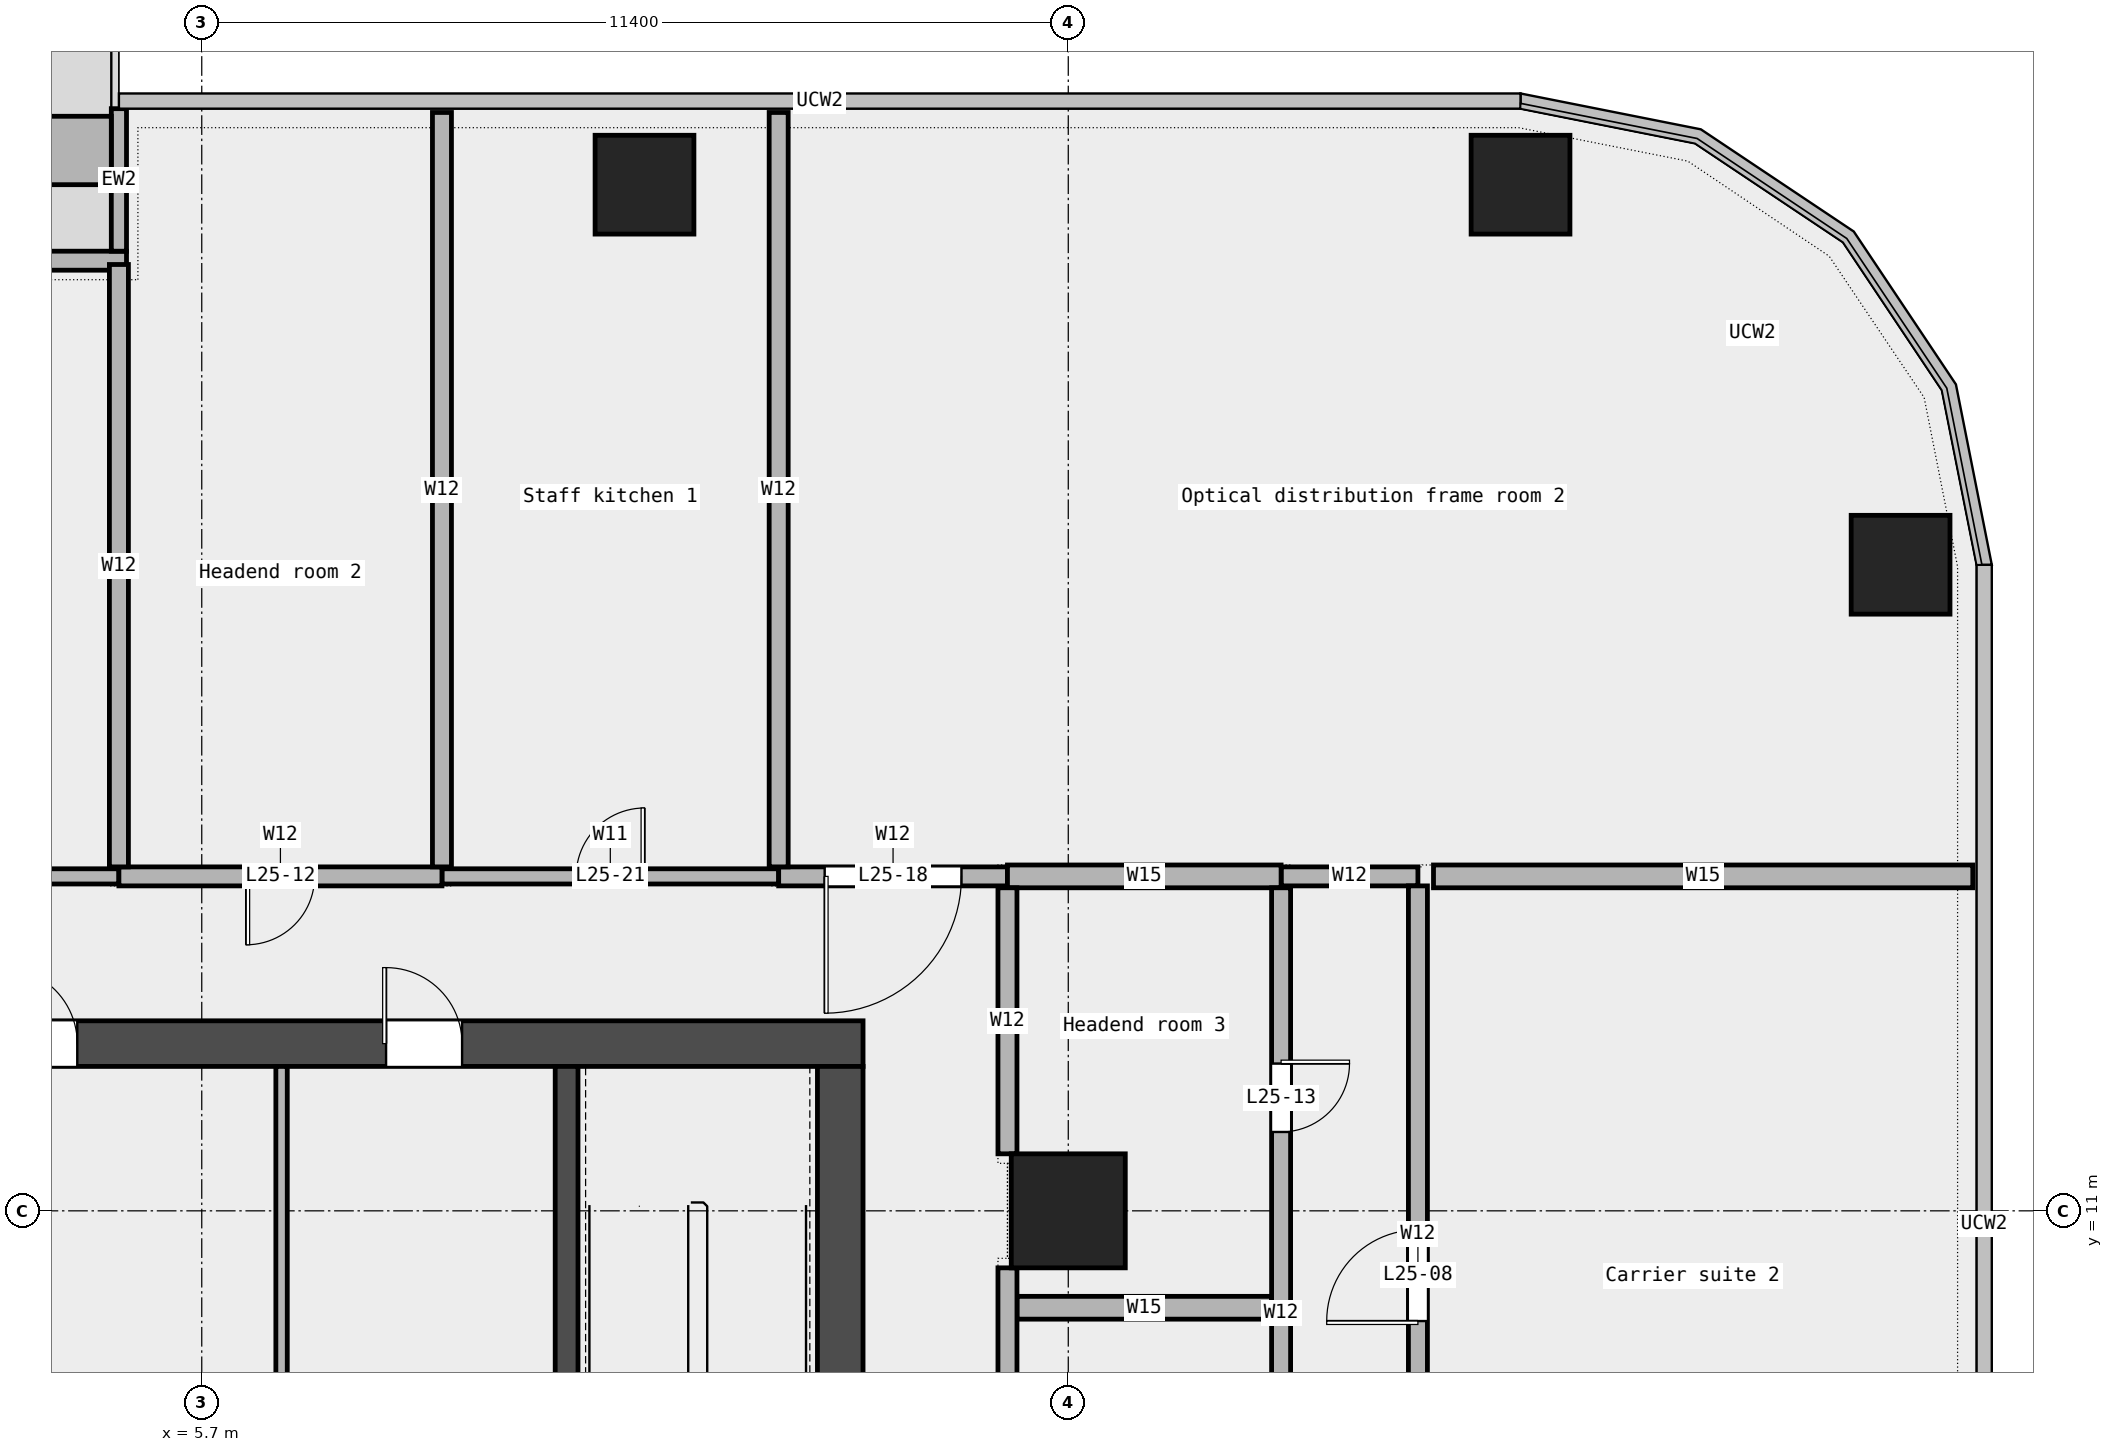
"""IFC4 building model, lengths in metres.
Left out: names, types, materials, properties, quantities, classifications, styles, units other than length and angle.
Written with IfcOpenShell. Run it as: python <this file> out.ifc"""

import sys

from ifc_helpers import new_model, si_unit, direction, frame, frame_2d, origin, origin_2d, place, context, subcontext, project, spatial, rectangle, extrude, element, fill, save


model = new_model("IFC4")
c1 = context("Model", 3, precision=1e-05, world=origin(), true_north=direction((0.0, 1.0)))
c2 = subcontext(c1, "Body", "Model", "MODEL_VIEW")
j1 = project(units=[si_unit("LENGTHUNIT", "METRE"), si_unit("PLANEANGLEUNIT", "RADIAN")], contexts=[c1])
p1 = place(None, origin())
s1 = spatial("IfcSite", under=j1, at=p1, CompositionType="ELEMENT")
p2 = place(p1, origin())
s2 = spatial("IfcBuilding", under=s1, at=p2, CompositionType="ELEMENT")
p3 = place(p2, frame((0.0, 0.0, 126.1)))
s3 = spatial("IfcBuildingStorey", under=s2, at=p3, CompositionType="ELEMENT", Elevation=126.1)
for number, where, z_axis, x_axis in (
    (1, (28.05, 19.5, 0.0), (0.0, 0.0, 1.0), (1.0, 0.0, 0.0)),
    (2, (23.05, 24.5, 0.0), (0.0, 0.0, 1.0), (1.0, 0.0, 0.0)),
    (3, (11.525, 24.5, 0.0), (0.0, 0.0, 1.0), (1.0, 0.0, 0.0)),
):
    element("IfcColumn", number, at=place(p3, frame(where, z_axis=z_axis, x_axis=x_axis)), inside=s3, PredefinedType="COLUMN", context=c2, shape_type="SweptSolid", body=[
        extrude(rectangle(XDim=1.3, YDim=1.3, at=origin_2d()), origin(), (0.0, 0.0, 1.0), 4.05),
    ])
p4 = place(p3, frame((17.1, 11.0, 0.0), z_axis=(0.0, 0.0, 1.0), x_axis=(1.0, 0.0, 0.0)))
e4 = element("IfcColumn", 4, at=p4, inside=s3, PredefinedType="COLUMN", context=c2, shape_type="SweptSolid", body=[
    extrude(rectangle(XDim=1.5, YDim=1.5, at=origin_2d()), origin(), (0.0, 0.0, 1.0), 4.05),
])
p5 = place(p3, frame((4.71, 23.5, 0.0), z_axis=(0.0, 0.0, 1.0), x_axis=(-1.0, 0.0, 0.0)))
e5 = element("IfcWall", 5, at=p5, inside=s3, PredefinedType="STANDARD", context=c2, shape_type="SweptSolid", body=[
    extrude(rectangle(XDim=14.03, YDim=0.25, at=frame_2d((7.015, 0.0))), origin(), (0.0, 0.0, 1.0), 4.05),
])
p6 = place(p5, frame((1.75, 0.0, 0.45)))
e6 = element("IfcOpeningElement", 6, at=p6, cuts=e5, PredefinedType="OPENING", context=c2, shape_type="SweptSolid", body=[
    extrude(rectangle(XDim=1.5, YDim=3.0, at=frame_2d((0.75, 1.5))), frame((0.0, 0.137, 0.0), z_axis=(0.0, -1.0, 0.0), x_axis=(1.0, 0.0, 0.0)), (0.0, 0.0, 1.0), 0.274),
])
p7 = place(p5, frame((6.0, 0.0, 0.0)))
e7 = element("IfcOpeningElement", 7, at=p7, cuts=e5, PredefinedType="OPENING", context=c2, shape_type="SweptSolid", body=[
    extrude(rectangle(XDim=1.8, YDim=2.4, at=frame_2d((0.9, 1.2))), frame((0.0, 0.137, 0.0), z_axis=(0.0, -1.0, 0.0), x_axis=(1.0, 0.0, 0.0)), (0.0, 0.0, 1.0), 0.274),
])
p8 = place(p5, frame((10.75, 0.0, 0.45)))
e8 = element("IfcOpeningElement", 8, at=p8, cuts=e5, PredefinedType="OPENING", context=c2, shape_type="SweptSolid", body=[
    extrude(rectangle(XDim=1.5, YDim=3.0, at=frame_2d((0.75, 1.5))), frame((0.0, 0.137, 0.0), z_axis=(0.0, -1.0, 0.0), x_axis=(1.0, 0.0, 0.0)), (0.0, 0.0, 1.0), 0.274),
])
p9 = place(p3, frame((4.61, 25.5, 0.0), z_axis=(0.0, 0.0, 1.0), x_axis=(0.0, -1.0, 0.0)))
e9 = element("IfcWall", 9, at=p9, inside=s3, PredefinedType="STANDARD", context=c2, shape_type="SweptSolid", body=[
    extrude(rectangle(XDim=1.875, YDim=0.2, at=frame_2d((0.938, 0.0))), origin(), (0.0, 0.0, 1.0), 4.05),
])
p10 = place(p3, frame((4.51, 24.95, 0.0), z_axis=(0.0, 0.0, 1.0), x_axis=(-1.0, 0.0, 0.0)))
e10 = element("IfcWall", 10, at=p10, inside=s3, PredefinedType="STANDARD", context=c2, shape_type="SweptSolid", body=[
    extrude(rectangle(XDim=3.6, YDim=0.9, at=frame_2d((1.8, 0.0))), origin(), (0.0, 0.0, 1.0), 0.7),
])
p11 = place(p3, frame((16.425, 9.725, 0.0), z_axis=(0.0, 0.0, 1.0), x_axis=(1.0, 0.0, 0.0)))
e11 = element("IfcWall", 11, at=p11, inside=s3, PredefinedType="PARTITIONING", context=c2, shape_type="SweptSolid", body=[
    extrude(rectangle(XDim=3.35, YDim=0.3, at=frame_2d((1.675, 0.0))), origin(), (0.0, 0.0, 1.0), 4.05),
])
p12 = place(p3, frame((-16.3, 15.4, 0.0), z_axis=(0.0, 0.0, 1.0), x_axis=(1.0, 0.0, 0.0)))
e12 = element("IfcWall", 12, at=p12, inside=s3, PredefinedType="PARTITIONING", context=c2, shape_type="SweptSolid", body=[
    extrude(rectangle(XDim=20.91, YDim=0.2, at=frame_2d((10.455, 0.0))), origin(), (0.0, 0.0, 1.0), 4.05),
])
p13 = place(p12, frame((13.245, 0.0, 0.0)))
e13 = element("IfcOpeningElement", 13, at=p13, cuts=e12, PredefinedType="OPENING", context=c2, shape_type="SweptSolid", body=[
    extrude(rectangle(XDim=1.5, YDim=2.1, at=frame_2d((0.75, 1.05))), frame((0.0, 0.112, 0.0), z_axis=(0.0, -1.0, 0.0), x_axis=(1.0, 0.0, 0.0)), (0.0, 0.0, 1.0), 0.224),
])
p14 = place(p12, frame((2.387, 0.0, 0.0)))
e14 = element("IfcOpeningElement", 14, at=p14, cuts=e12, PredefinedType="OPENING", context=c2, shape_type="SweptSolid", body=[
    extrude(rectangle(XDim=1.2, YDim=2.1, at=frame_2d((0.6, 1.05))), frame((0.0, 0.112, 0.0), z_axis=(0.0, -1.0, 0.0), x_axis=(1.0, 0.0, 0.0)), (0.0, 0.0, 1.0), 0.224),
])
p15 = place(p3, frame((8.86, 15.4, 0.0), z_axis=(0.0, 0.0, 1.0), x_axis=(1.0, 0.0, 0.0)))
e15 = element("IfcWall", 15, at=p15, inside=s3, PredefinedType="PARTITIONING", context=c2, shape_type="SweptSolid", body=[
    extrude(rectangle(XDim=4.43, YDim=0.2, at=frame_2d((2.215, 0.0))), origin(), (0.0, 0.0, 1.0), 4.05),
])
p16 = place(p15, frame((1.765, 0.0, 0.0)))
e16 = element("IfcOpeningElement", 16, at=p16, cuts=e15, PredefinedType="OPENING", context=c2, shape_type="SweptSolid", body=[
    extrude(rectangle(XDim=0.9, YDim=2.1, at=frame_2d((0.45, 1.05))), frame((0.0, 0.112, 0.0), z_axis=(0.0, -1.0, 0.0), x_axis=(1.0, 0.0, 0.0)), (0.0, 0.0, 1.0), 0.224),
])
p17 = place(p3, frame((4.61, 15.4, 0.0), z_axis=(0.0, 0.0, 1.0), x_axis=(1.0, 0.0, 0.0)))
e17 = element("IfcWall", 17, at=p17, inside=s3, PredefinedType="PARTITIONING", context=c2, shape_type="SweptSolid", body=[
    extrude(rectangle(XDim=4.25, YDim=0.25, at=frame_2d((2.125, 0.0))), origin(), (0.0, 0.0, 1.0), 4.05),
])
p18 = place(p17, frame((1.675, 0.0, 0.0)))
e18 = element("IfcOpeningElement", 18, at=p18, cuts=e17, PredefinedType="OPENING", context=c2, shape_type="SweptSolid", body=[
    extrude(rectangle(XDim=0.9, YDim=2.1, at=frame_2d((0.45, 1.05))), frame((0.0, 0.137, 0.0), z_axis=(0.0, -1.0, 0.0), x_axis=(1.0, 0.0, 0.0)), (0.0, 0.0, 1.0), 0.274),
])
p19 = place(p3, frame((13.29, 15.4, 0.0), z_axis=(0.0, 0.0, 1.0), x_axis=(1.0, 0.0, 0.0)))
e19 = element("IfcWall", 19, at=p19, inside=s3, PredefinedType="PARTITIONING", context=c2, shape_type="SweptSolid", body=[
    extrude(rectangle(XDim=3.01, YDim=0.25, at=frame_2d((1.505, 0.0))), origin(), (0.0, 0.0, 1.0), 4.05),
])
p20 = place(p19, frame((0.605, 0.0, 0.0)))
e20 = element("IfcOpeningElement", 20, at=p20, cuts=e19, PredefinedType="OPENING", context=c2, shape_type="SweptSolid", body=[
    extrude(rectangle(XDim=1.8, YDim=2.1, at=frame_2d((0.9, 1.05))), frame((0.0, 0.137, 0.0), z_axis=(0.0, -1.0, 0.0), x_axis=(1.0, 0.0, 0.0)), (0.0, 0.0, 1.0), 0.274),
])
p21 = place(p3, frame((19.9, 15.4, 0.0), z_axis=(0.0, 0.0, 1.0), x_axis=(1.0, 0.0, 0.0)))
e21 = element("IfcWall", 21, at=p21, inside=s3, PredefinedType="PARTITIONING", context=c2, shape_type="SweptSolid", body=[
    extrude(rectangle(XDim=1.8, YDim=0.25, at=frame_2d((0.9, 0.0))), origin(), (0.0, 0.0, 1.0), 4.05),
])
p22 = place(p3, frame((16.3, 15.4, 0.0), z_axis=(0.0, 0.0, 1.0), x_axis=(1.0, 0.0, 0.0)))
e22 = element("IfcWall", 22, at=p22, inside=s3, PredefinedType="PARTITIONING", context=c2, shape_type="SweptSolid", body=[
    extrude(rectangle(XDim=3.6, YDim=0.3, at=frame_2d((1.8, 0.0))), origin(), (0.0, 0.0, 1.0), 4.05),
])
p23 = place(p3, frame((21.905, 15.4, 0.0), z_axis=(0.0, 0.0, 1.0), x_axis=(1.0, 0.0, 0.0)))
e23 = element("IfcWall", 23, at=p23, inside=s3, PredefinedType="PARTITIONING", context=c2, shape_type="SweptSolid", body=[
    extrude(rectangle(XDim=7.095, YDim=0.3, at=frame_2d((3.547, 0.0))), origin(), (0.0, 0.0, 1.0), 4.05),
])
p24 = place(p3, frame((4.61, 15.525, 0.0), z_axis=(0.0, 0.0, 1.0), x_axis=(0.0, 1.0, 0.0)))
e24 = element("IfcWall", 24, at=p24, inside=s3, PredefinedType="PARTITIONING", context=c2, shape_type="SweptSolid", body=[
    extrude(rectangle(XDim=7.925, YDim=0.25, at=frame_2d((3.962, 0.0))), origin(), (0.0, 0.0, 1.0), 4.05),
])
for number, where, z_axis, x_axis in (
    (25, (8.86, 15.525, 0.0), (0.0, 0.0, 1.0), (0.0, 1.0, 0.0)),
    (26, (13.29, 15.525, 0.0), (0.0, 0.0, 1.0), (0.0, 1.0, 0.0)),
):
    element("IfcWall", number, at=place(p3, frame(where, z_axis=z_axis, x_axis=x_axis)), inside=s3, PredefinedType="PARTITIONING", context=c2, shape_type="SweptSolid", body=[
        extrude(rectangle(XDim=9.925, YDim=0.25, at=frame_2d((4.962, 0.0))), origin(), (0.0, 0.0, 1.0), 4.05),
    ])
p25 = place(p3, frame((16.3, 4.07, 0.0), z_axis=(0.0, 0.0, 1.0), x_axis=(0.0, 1.0, 0.0)))
e27 = element("IfcWall", 27, at=p25, inside=s3, PredefinedType="PARTITIONING", context=c2, shape_type="SweptSolid", body=[
    extrude(rectangle(XDim=6.18, YDim=0.25, at=frame_2d((3.09, 0.0))), origin(), (0.0, 0.0, 1.0), 4.05),
])
p26 = place(p3, frame((16.3, 11.75, 0.0), z_axis=(0.0, 0.0, 1.0), x_axis=(0.0, 1.0, 0.0)))
e28 = element("IfcWall", 28, at=p26, inside=s3, PredefinedType="PARTITIONING", context=c2, shape_type="SweptSolid", body=[
    extrude(rectangle(XDim=3.5, YDim=0.25, at=frame_2d((1.75, 0.0))), origin(), (0.0, 0.0, 1.0), 4.05),
])
p27 = place(p3, frame((19.9, 4.07, 0.0), z_axis=(0.0, 0.0, 1.0), x_axis=(0.0, 1.0, 0.0)))
e29 = element("IfcWall", 29, at=p27, inside=s3, PredefinedType="PARTITIONING", context=c2, shape_type="SweptSolid", body=[
    extrude(rectangle(XDim=11.18, YDim=0.25, at=frame_2d((5.59, 0.0))), origin(), (0.0, 0.0, 1.0), 4.05),
])
p28 = place(p27, frame((2.377, 0.0, 0.0)))
e30 = element("IfcOpeningElement", 30, at=p28, cuts=e29, PredefinedType="OPENING", context=c2, shape_type="SweptSolid", body=[
    extrude(rectangle(XDim=0.9, YDim=2.1, at=frame_2d((0.45, 1.05))), frame((0.0, 0.137, 0.0), z_axis=(0.0, -1.0, 0.0), x_axis=(1.0, 0.0, 0.0)), (0.0, 0.0, 1.0), 0.274),
])
p29 = place(p27, frame((7.968, 0.0, 0.0)))
e31 = element("IfcOpeningElement", 31, at=p29, cuts=e29, PredefinedType="OPENING", context=c2, shape_type="SweptSolid", body=[
    extrude(rectangle(XDim=0.9, YDim=2.1, at=frame_2d((0.45, 1.05))), frame((0.0, 0.137, 0.0), z_axis=(0.0, -1.0, 0.0), x_axis=(1.0, 0.0, 0.0)), (0.0, 0.0, 1.0), 0.274),
])
p30 = place(p3, frame((21.7, 5.025, 0.0), z_axis=(0.0, 0.0, 1.0), x_axis=(0.0, 1.0, 0.0)))
e32 = element("IfcWall", 32, at=p30, inside=s3, PredefinedType="PARTITIONING", context=c2, shape_type="SweptSolid", body=[
    extrude(rectangle(XDim=10.25, YDim=0.25, at=frame_2d((5.125, 0.0))), origin(), (0.0, 0.0, 1.0), 4.05),
])
p31 = place(p30, frame((4.525, 0.0, 0.0)))
e33 = element("IfcOpeningElement", 33, at=p31, cuts=e32, PredefinedType="OPENING", context=c2, shape_type="SweptSolid", body=[
    extrude(rectangle(XDim=1.2, YDim=2.1, at=frame_2d((0.6, 1.05))), frame((0.0, 0.137, 0.0), z_axis=(0.0, -1.0, 0.0), x_axis=(1.0, 0.0, 0.0)), (0.0, 0.0, 1.0), 0.274),
])
p32 = place(p3, frame((-14.4, 13.2, 0.0), z_axis=(0.0, 0.0, 1.0), x_axis=(1.0, 0.0, 0.0)))
e34 = element("IfcWall", 34, at=p32, inside=s3, PredefinedType="SHEAR", context=c2, shape_type="SweptSolid", body=[
    extrude(rectangle(XDim=28.8, YDim=0.6, at=frame_2d((14.4, 0.0))), origin(), (0.0, 0.0, 1.0), 4.2),
])
p33 = place(p32, frame((6.587, 0.0, 0.0)))
e35 = element("IfcOpeningElement", 35, at=p33, cuts=e34, PredefinedType="OPENING", context=c2, shape_type="SweptSolid", body=[
    extrude(rectangle(XDim=1.0, YDim=2.1, at=frame_2d((0.5, 1.05))), frame((0.0, 0.312, 0.0), z_axis=(0.0, -1.0, 0.0), x_axis=(1.0, 0.0, 0.0)), (0.0, 0.0, 1.0), 0.624),
])
p34 = place(p32, frame((12.025, 0.0, 0.0)))
e36 = element("IfcOpeningElement", 36, at=p34, cuts=e34, PredefinedType="OPENING", context=c2, shape_type="SweptSolid", body=[
    extrude(rectangle(XDim=1.0, YDim=2.1, at=frame_2d((0.5, 1.05))), frame((0.0, 0.312, 0.0), z_axis=(0.0, -1.0, 0.0), x_axis=(1.0, 0.0, 0.0)), (0.0, 0.0, 1.0), 0.624),
])
p35 = place(p32, frame((17.462, 0.0, 0.0)))
e37 = element("IfcOpeningElement", 37, at=p35, cuts=e34, PredefinedType="OPENING", context=c2, shape_type="SweptSolid", body=[
    extrude(rectangle(XDim=1.0, YDim=2.1, at=frame_2d((0.5, 1.05))), frame((0.0, 0.312, 0.0), z_axis=(0.0, -1.0, 0.0), x_axis=(1.0, 0.0, 0.0)), (0.0, 0.0, 1.0), 0.624),
])
p36 = place(p32, frame((22.525, 0.0, 0.0)))
e38 = element("IfcOpeningElement", 38, at=p36, cuts=e34, PredefinedType="OPENING", context=c2, shape_type="SweptSolid", body=[
    extrude(rectangle(XDim=1.0, YDim=2.1, at=frame_2d((0.5, 1.05))), frame((0.0, 0.312, 0.0), z_axis=(0.0, -1.0, 0.0), x_axis=(1.0, 0.0, 0.0)), (0.0, 0.0, 1.0), 0.624),
])
p37 = place(p3, frame((14.1, -6.6, 0.0), z_axis=(0.0, 0.0, 1.0), x_axis=(0.0, 1.0, 0.0)))
e39 = element("IfcWall", 39, at=p37, inside=s3, PredefinedType="SHEAR", context=c2, shape_type="SweptSolid", body=[
    extrude(rectangle(XDim=19.5, YDim=0.6, at=frame_2d((9.75, 0.0))), origin(), (0.0, 0.0, 1.0), 4.2),
])
p38 = place(p37, frame((9.3, 0.0, 0.0)))
e40 = element("IfcOpeningElement", 40, at=p38, cuts=e39, PredefinedType="OPENING", context=c2, shape_type="SweptSolid", body=[
    extrude(rectangle(XDim=1.8, YDim=2.1, at=frame_2d((0.9, 1.05))), frame((0.0, 0.312, 0.0), z_axis=(0.0, -1.0, 0.0), x_axis=(1.0, 0.0, 0.0)), (0.0, 0.0, 1.0), 0.624),
])
p39 = place(p3, frame((10.5, 5.25, 0.0), z_axis=(0.0, 0.0, 1.0), x_axis=(0.0, 1.0, 0.0)))
e41 = element("IfcWall", 41, at=p39, inside=s3, PredefinedType="SHEAR", context=c2, shape_type="SweptSolid", body=[
    extrude(rectangle(XDim=7.65, YDim=0.3, at=frame_2d((3.825, 0.0))), origin(), (0.0, 0.0, 1.0), 4.2),
])
p40 = place(p3, frame((6.75, 8.55, 0.0), z_axis=(0.0, 0.0, 1.0), x_axis=(0.0, 1.0, 0.0)))
e42 = element("IfcWall", 42, at=p40, inside=s3, PredefinedType="PARTITIONING", context=c2, shape_type="SweptSolid", body=[
    extrude(rectangle(XDim=4.35, YDim=0.15, at=frame_2d((2.175, 0.0))), origin(), (0.0, 0.0, 1.0), 4.2),
])
p41 = place(p31, origin())
e43 = element("IfcDoor", 43, at=p41, inside=s3, OperationType="SINGLE_SWING_LEFT", PredefinedType="DOOR", context=c2, shape_type="SweptSolid", body=[
    extrude(rectangle(XDim=1.2, YDim=2.1, at=frame_2d((0.6, 1.05))), frame((0.0, 0.025, 0.0), z_axis=(0.0, -1.0, 0.0), x_axis=(1.0, 0.0, 0.0)), (0.0, 0.0, 1.0), 0.05),
])
fill(e33, e43)
p42 = place(p18, origin())
e44 = element("IfcDoor", 44, at=p42, inside=s3, OperationType="SINGLE_SWING_RIGHT", PredefinedType="DOOR", context=c2, shape_type="SweptSolid", body=[
    extrude(rectangle(XDim=0.9, YDim=2.1, at=frame_2d((0.45, 1.05))), frame((0.0, 0.025, 0.0), z_axis=(0.0, -1.0, 0.0), x_axis=(1.0, 0.0, 0.0)), (0.0, 0.0, 1.0), 0.05),
])
fill(e18, e44)
p43 = place(p29, origin())
e45 = element("IfcDoor", 45, at=p43, inside=s3, OperationType="SINGLE_SWING_LEFT", PredefinedType="DOOR", context=c2, shape_type="SweptSolid", body=[
    extrude(rectangle(XDim=0.9, YDim=2.1, at=frame_2d((0.45, 1.05))), frame((0.0, 0.025, 0.0), z_axis=(0.0, -1.0, 0.0), x_axis=(1.0, 0.0, 0.0)), (0.0, 0.0, 1.0), 0.05),
])
fill(e31, e45)
p44 = place(p20, origin())
e46 = element("IfcDoor", 46, at=p44, inside=s3, OperationType="DOUBLE_DOOR_SINGLE_SWING", PredefinedType="DOOR", context=c2, shape_type="SweptSolid", body=[
    extrude(rectangle(XDim=1.8, YDim=2.1, at=frame_2d((0.9, 1.05))), frame((0.0, 0.025, 0.0), z_axis=(0.0, -1.0, 0.0), x_axis=(1.0, 0.0, 0.0)), (0.0, 0.0, 1.0), 0.05),
])
fill(e20, e46)
p45 = place(p16, origin())
e47 = element("IfcDoor", 47, at=p45, inside=s3, OperationType="SINGLE_SWING_RIGHT", PredefinedType="DOOR", context=c2, shape_type="SweptSolid", body=[
    extrude(rectangle(XDim=0.9, YDim=2.1, at=frame_2d((0.45, 1.05))), frame((0.0, 0.025, 0.0), z_axis=(0.0, -1.0, 0.0), x_axis=(1.0, 0.0, 0.0)), (0.0, 0.0, 1.0), 0.05),
])
fill(e16, e47)
p46 = place(p35, origin())
e48 = element("IfcDoor", 48, at=p46, inside=s3, OperationType="SINGLE_SWING_LEFT", PredefinedType="DOOR", context=c2, shape_type="SweptSolid", body=[
    extrude(rectangle(XDim=1.0, YDim=2.1, at=frame_2d((0.5, 1.05))), frame((0.0, 0.025, 0.0), z_axis=(0.0, -1.0, 0.0), x_axis=(1.0, 0.0, 0.0)), (0.0, 0.0, 1.0), 0.05),
])
fill(e37, e48)
p47 = place(p36, origin())
e49 = element("IfcDoor", 49, at=p47, inside=s3, OperationType="SINGLE_SWING_LEFT", PredefinedType="DOOR", context=c2, shape_type="SweptSolid", body=[
    extrude(rectangle(XDim=1.0, YDim=2.1, at=frame_2d((0.5, 1.05))), frame((0.0, 0.025, 0.0), z_axis=(0.0, -1.0, 0.0), x_axis=(1.0, 0.0, 0.0)), (0.0, 0.0, 1.0), 0.05),
])
fill(e38, e49)
save(model, sys.argv[1])
